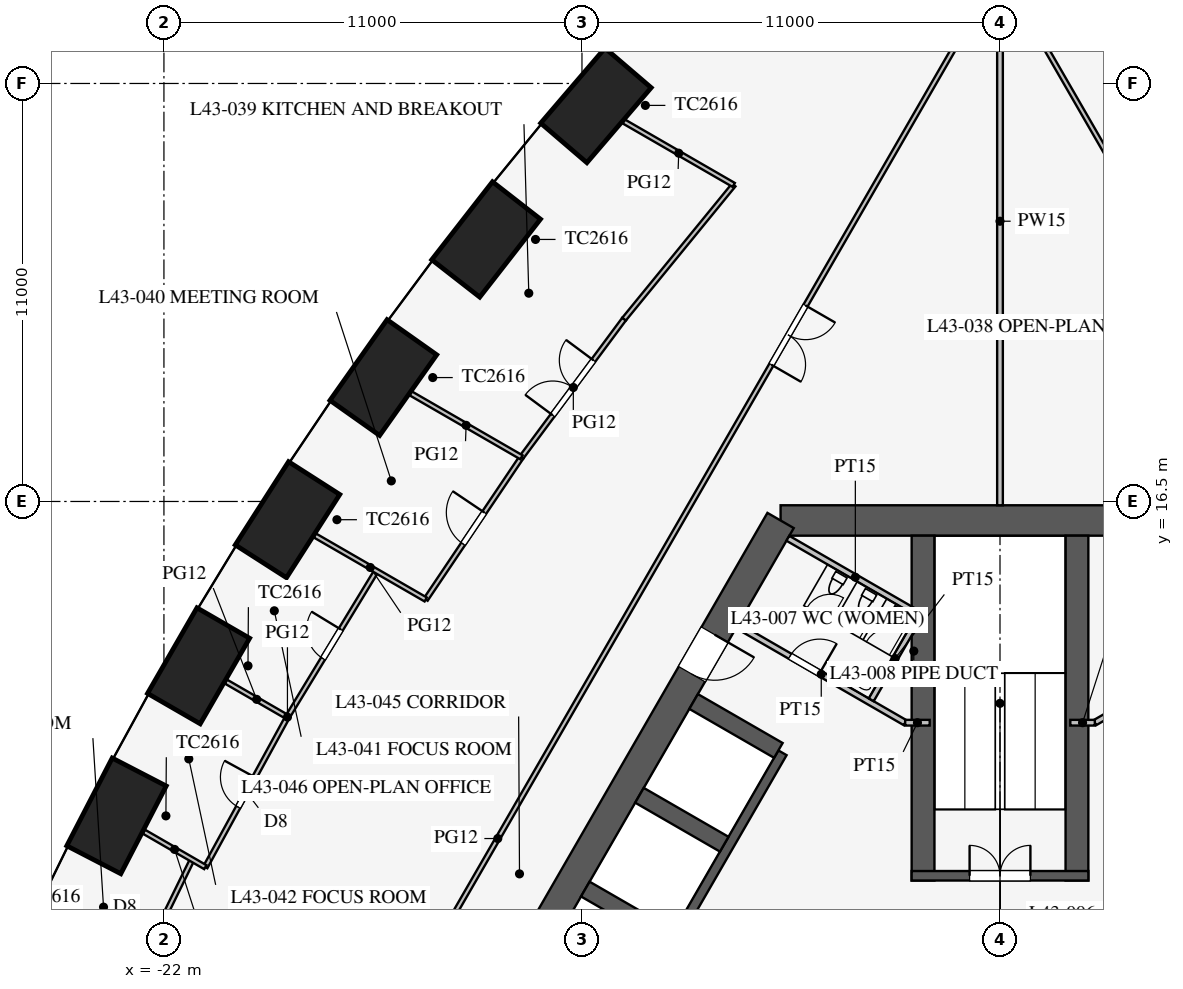
"""IFC4 building model, lengths in metres.
Left out: names, types, materials, properties, quantities, classifications, styles, units other than length and angle.
Written with IfcOpenShell. Run it as: python <this file> out.ifc"""

import sys

from ifc_helpers import new_model, si_unit, direction, frame, frame_2d, origin, origin_2d, place, context, subcontext, project, spatial, rectangle, extrude, element, fill, save


model = new_model("IFC4")
c1 = context("Model", 3, precision=1e-05, world=origin(), true_north=direction((0.0, 1.0)))
c2 = subcontext(c1, "Body", "Model", "MODEL_VIEW")
j1 = project(units=[si_unit("LENGTHUNIT", "METRE"), si_unit("PLANEANGLEUNIT", "RADIAN")], contexts=[c1])
p1 = place(None, origin())
s1 = spatial("IfcSite", under=j1, at=p1, CompositionType="ELEMENT")
p2 = place(p1, origin())
s2 = spatial("IfcBuilding", under=s1, at=p2, CompositionType="ELEMENT")
p3 = place(p2, frame((0.0, 0.0, 189.7)))
s3 = spatial("IfcBuildingStorey", under=s2, at=p3, CompositionType="ELEMENT", Elevation=189.7)
for number, where, z_axis, x_axis in (
    (1, (-10.632, 26.923, 0.0), (0.0, 0.0, 1.0), (-0.651, -0.759, 0.0)),
    (2, (-13.522, 23.396, 0.0), (0.0, 0.0, 1.0), (-0.615, -0.789, 0.0)),
    (3, (-16.227, 19.761, 0.0), (0.0, 0.0, 1.0), (-0.577, -0.816, 0.0)),
    (4, (-18.748, 16.02, 0.0), (0.0, 0.0, 1.0), (-0.539, -0.842, 0.0)),
    (5, (-21.088, 12.175, 0.0), (0.0, 0.0, 1.0), (-0.5, -0.866, 0.0)),
    (6, (-23.248, 8.226, 0.0), (0.0, 0.0, 1.0), (-0.46, -0.888, 0.0)),
):
    element("IfcColumn", number, at=place(p3, frame(where, z_axis=z_axis, x_axis=x_axis)), inside=s3, PredefinedType="COLUMN", context=c2, shape_type="SweptSolid", body=[
        extrude(rectangle(XDim=2.6, YDim=1.6, at=origin_2d()), origin(), (0.0, 0.0, 1.0), 4.2),
    ])
p4 = place(p3, frame((5.773, 16.0, 0.0), z_axis=(0.0, 0.0, 1.0), x_axis=(-1.0, 0.0, 0.0)))
e7 = element("IfcWall", 7, at=p4, inside=s3, PredefinedType="SHEAR", context=c2, shape_type="SweptSolid", body=[
    extrude(rectangle(XDim=11.547, YDim=0.8, at=frame_2d((5.773, 0.0))), origin(), (0.0, 0.0, 1.0), 4.2),
])
p5 = place(p3, frame((-5.773, 16.0, 0.0), z_axis=(0.0, 0.0, 1.0), x_axis=(-0.500002442456, -0.866023993627, 0.0)))
e8 = element("IfcWall", 8, at=p5, inside=s3, PredefinedType="SHEAR", context=c2, shape_type="SweptSolid", body=[
    extrude(rectangle(XDim=21.939, YDim=0.8, at=frame_2d((10.97, 0.0))), origin(), (0.0, 0.0, 1.0), 4.2),
])
p6 = place(p5, frame((17.27, 0.0, 0.0)))
e9 = element("IfcOpeningElement", 9, at=p6, cuts=e8, PredefinedType="OPENING", context=c2, shape_type="SweptSolid", body=[
    extrude(rectangle(XDim=1.2, YDim=2.1, at=frame_2d((0.6, 1.05))), frame((0.0, 0.41, 0.0), z_axis=(0.0, -1.0, 0.0), x_axis=(1.0, 0.0, 0.0)), (0.0, 0.0, 1.0), 0.82),
])
p7 = place(p5, frame((3.47, 0.0, 0.0)))
e10 = element("IfcOpeningElement", 10, at=p7, cuts=e8, PredefinedType="OPENING", context=c2, shape_type="SweptSolid", body=[
    extrude(rectangle(XDim=1.2, YDim=2.1, at=frame_2d((0.6, 1.05))), frame((0.0, 0.41, 0.0), z_axis=(0.0, -1.0, 0.0), x_axis=(1.0, 0.0, 0.0)), (0.0, 0.0, 1.0), 0.82),
])
p8 = place(p3, frame((-5.724, 9.886, 0.0), z_axis=(0.0, 0.0, 1.0), x_axis=(-0.500001763848, -0.866024385424, 0.0)))
e11 = element("IfcWall", 11, at=p8, inside=s3, PredefinedType="SHEAR", context=c2, shape_type="SweptSolid", body=[
    extrude(rectangle(XDim=11.4, YDim=0.25, at=frame_2d((5.7, 0.0))), origin(), (0.0, 0.0, 1.0), 4.2),
])
p9 = place(p8, frame((6.525, 0.0, 0.0)))
e12 = element("IfcOpeningElement", 12, at=p9, cuts=e11, PredefinedType="OPENING", context=c2, shape_type="SweptSolid", body=[
    extrude(rectangle(XDim=1.2, YDim=2.2, at=frame_2d((0.6, 1.1))), frame((0.0, 0.135, 0.0), z_axis=(0.0, -1.0, 0.0), x_axis=(1.0, 0.0, 0.0)), (0.0, 0.0, 1.0), 0.27),
])
p10 = place(p8, frame((9.375, 0.0, 0.0)))
e13 = element("IfcOpeningElement", 13, at=p10, cuts=e11, PredefinedType="OPENING", context=c2, shape_type="SweptSolid", body=[
    extrude(rectangle(XDim=1.2, YDim=2.2, at=frame_2d((0.6, 1.1))), frame((0.0, 0.135, 0.0), z_axis=(0.0, -1.0, 0.0), x_axis=(1.0, 0.0, 0.0)), (0.0, 0.0, 1.0), 0.27),
])
p11 = place(p3, frame((-5.832, 9.949, 0.0), z_axis=(0.0, 0.0, 1.0), x_axis=(-0.866029291668, 0.499993265928, 0.0)))
e14 = element("IfcWall", 14, at=p11, inside=s3, PredefinedType="SHEAR", context=c2, shape_type="SweptSolid", body=[
    extrude(rectangle(XDim=2.575, YDim=0.45, at=frame_2d((1.288, 0.0))), origin(), (0.0, 0.0, 1.0), 4.2),
])
for number, where, z_axis, x_axis in (
    (15, (-7.257, 7.481, 0.0), (0.0, 0.0, 1.0), (-0.866, 0.5, 0.0)),
    (16, (-8.682, 5.012, 0.0), (0.0, 0.0, 1.0), (-0.866, 0.5, 0.0)),
):
    element("IfcWall", number, at=place(p3, frame(where, z_axis=z_axis, x_axis=x_axis)), inside=s3, PredefinedType="SHEAR", context=c2, shape_type="SweptSolid", body=[
        extrude(rectangle(XDim=2.575, YDim=0.45, at=frame_2d((1.288, 0.0))), origin(), (0.0, 0.0, 1.0), 4.2),
    ])
for number, where, z_axis, x_axis in (
    (17, (2.025, 6.525, 0.0), (0.0, 0.0, 1.0), (0.0, 1.0, 0.0)),
    (18, (-2.025, 6.525, 0.0), (0.0, 0.0, 1.0), (0.0, 1.0, 0.0)),
):
    element("IfcWall", number, at=place(p3, frame(where, z_axis=z_axis, x_axis=x_axis)), inside=s3, PredefinedType="SHEAR", context=c2, shape_type="SweptSolid", body=[
        extrude(rectangle(XDim=9.075, YDim=0.6, at=frame_2d((4.538, 0.0))), origin(), (0.0, 0.0, 1.0), 4.2),
    ])
p12 = place(p3, frame((2.325, 6.65, 0.0), z_axis=(0.0, 0.0, 1.0), x_axis=(-1.0, 0.0, 0.0)))
e19 = element("IfcWall", 19, at=p12, inside=s3, PredefinedType="SHEAR", context=c2, shape_type="SweptSolid", body=[
    extrude(rectangle(XDim=4.65, YDim=0.25, at=frame_2d((2.325, 0.0))), origin(), (0.0, 0.0, 1.0), 4.2),
])
p13 = place(p12, frame((1.525, 0.0, 0.0)))
e20 = element("IfcOpeningElement", 20, at=p13, cuts=e19, PredefinedType="OPENING", context=c2, shape_type="SweptSolid", body=[
    extrude(rectangle(XDim=1.6, YDim=2.1, at=frame_2d((0.8, 1.05))), frame((0.0, 0.135, 0.0), z_axis=(0.0, -1.0, 0.0), x_axis=(1.0, 0.0, 0.0)), (0.0, 0.0, 1.0), 0.27),
])
p14 = place(p3, frame((2.495, 10.678, 0.0), z_axis=(0.0, 0.0, 1.0), x_axis=(0.86602216432, 0.500005610874, 0.0)))
e21 = element("IfcWall", 21, at=p14, inside=s3, PredefinedType="PARTITIONING", context=c2, shape_type="SweptSolid", body=[
    extrude(rectangle(XDim=5.1, YDim=0.15, at=frame_2d((2.55, 0.0))), origin(), (0.0, 0.0, 1.0), 4.0),
])
p15 = place(p14, frame((2.6, 0.0, 0.0)))
e22 = element("IfcOpeningElement", 22, at=p15, cuts=e21, PredefinedType="OPENING", context=c2, shape_type="SweptSolid", body=[
    extrude(rectangle(XDim=0.9, YDim=2.1, at=frame_2d((0.45, 1.05))), frame((0.0, 0.085, 0.0), z_axis=(0.0, -1.0, 0.0), x_axis=(1.0, 0.0, 0.0)), (0.0, 0.0, 1.0), 0.17),
])
p16 = place(p3, frame((-2.495, 10.678, 0.0), z_axis=(0.0, 0.0, 1.0), x_axis=(-0.86602216432, 0.500005610874, 0.0)))
e23 = element("IfcWall", 23, at=p16, inside=s3, PredefinedType="PARTITIONING", context=c2, shape_type="SweptSolid", body=[
    extrude(rectangle(XDim=5.1, YDim=0.15, at=frame_2d((2.55, 0.0))), origin(), (0.0, 0.0, 1.0), 4.0),
])
p17 = place(p16, frame((2.6, 0.0, 0.0)))
e24 = element("IfcOpeningElement", 24, at=p17, cuts=e23, PredefinedType="OPENING", context=c2, shape_type="SweptSolid", body=[
    extrude(rectangle(XDim=0.9, YDim=2.1, at=frame_2d((0.45, 1.05))), frame((0.0, 0.085, 0.0), z_axis=(0.0, -1.0, 0.0), x_axis=(1.0, 0.0, 0.0)), (0.0, 0.0, 1.0), 0.17),
])
for number, where, z_axis, x_axis in (
    (25, (2.495, 10.678, 0.0), (0.0, 0.0, 1.0), (-1.0, 0.0, 0.0)),
    (26, (-2.495, 10.678, 0.0), (0.0, 0.0, 1.0), (1.0, 0.0, 0.0)),
):
    element("IfcWall", number, at=place(p3, frame(where, z_axis=z_axis, x_axis=x_axis)), inside=s3, PredefinedType="PARTITIONING", context=c2, shape_type="SweptSolid", body=[
        extrude(rectangle(XDim=0.645, YDim=0.15, at=frame_2d((0.323, 0.0))), origin(), (0.0, 0.0, 1.0), 4.0),
    ])
p18 = place(p3, frame((-2.031, 13.482, 0.0), z_axis=(0.0, 0.0, 1.0), x_axis=(-0.866050731258, 0.499956128963, 0.0)))
e27 = element("IfcWall", 27, at=p18, inside=s3, PredefinedType="PARTITIONING", context=c2, shape_type="SweptSolid", body=[
    extrude(rectangle(XDim=4.1, YDim=0.15, at=frame_2d((2.05, 0.0))), origin(), (0.0, 0.0, 1.0), 4.0),
])
p19 = place(p3, frame((-3.389, 11.281, 0.0), z_axis=(0.0, 0.0, 1.0), x_axis=(0.499989096993, 0.866031698547, 0.0)))
e28 = element("IfcWall", 28, at=p19, inside=s3, PredefinedType="PARTITIONING", context=c2, shape_type="SweptSolid", body=[
    extrude(rectangle(XDim=2.51, YDim=0.15, at=frame_2d((1.255, 0.0))), origin(), (0.0, 0.0, 1.0), 4.0),
])
p20 = place(p3, frame((0.0, 16.4, 0.0), z_axis=(0.0, 0.0, 1.0), x_axis=(0.0, 1.0, 0.0)))
e29 = element("IfcWall", 29, at=p20, inside=s3, PredefinedType="PARTITIONING", context=c2, shape_type="SweptSolid", body=[
    extrude(rectangle(XDim=14.95, YDim=0.15, at=frame_2d((7.475, 0.0))), origin(), (0.0, 0.0, 1.0), 2.4),
])
p21 = place(p3, frame((26.415, -15.231, 0.0), z_axis=(0.0, 0.0, 1.0), x_axis=(-0.50000091641, 0.866024874695, 0.0)))
e30 = element("IfcWall", 30, at=p21, inside=s3, PredefinedType="PARTITIONING", context=c2, shape_type="SweptSolid", body=[
    extrude(rectangle(XDim=52.796, YDim=0.12, at=frame_2d((26.398, 0.0))), origin(), (0.0, 0.0, 1.0), 2.9),
])
p22 = place(p21, frame((10.2, 0.0, 0.15)))
e31 = element("IfcOpeningElement", 31, at=p22, cuts=e30, PredefinedType="OPENING", context=c2, shape_type="SweptSolid", body=[
    extrude(rectangle(XDim=1.8, YDim=2.1, at=frame_2d((0.9, 1.05))), frame((0.0, 0.07, 0.0), z_axis=(0.0, -1.0, 0.0), x_axis=(1.0, 0.0, 0.0)), (0.0, 0.0, 1.0), 0.14),
])
p23 = place(p21, frame((40.8, 0.0, 0.15)))
e32 = element("IfcOpeningElement", 32, at=p23, cuts=e30, PredefinedType="OPENING", context=c2, shape_type="SweptSolid", body=[
    extrude(rectangle(XDim=1.8, YDim=2.1, at=frame_2d((0.9, 1.05))), frame((0.0, 0.07, 0.0), z_axis=(0.0, -1.0, 0.0), x_axis=(1.0, 0.0, 0.0)), (0.0, 0.0, 1.0), 0.14),
])
p24 = place(p3, frame((-0.016, 30.491, 0.0), z_axis=(0.0, 0.0, 1.0), x_axis=(-0.50000091641, -0.866024874695, 0.0)))
e33 = element("IfcWall", 33, at=p24, inside=s3, PredefinedType="PARTITIONING", context=c2, shape_type="SweptSolid", body=[
    extrude(rectangle(XDim=52.796, YDim=0.12, at=frame_2d((26.398, 0.0))), origin(), (0.0, 0.0, 1.0), 2.9),
])
p25 = place(p24, frame((10.2, 0.0, 0.15)))
e34 = element("IfcOpeningElement", 34, at=p25, cuts=e33, PredefinedType="OPENING", context=c2, shape_type="SweptSolid", body=[
    extrude(rectangle(XDim=1.8, YDim=2.1, at=frame_2d((0.9, 1.05))), frame((0.0, 0.07, 0.0), z_axis=(0.0, -1.0, 0.0), x_axis=(1.0, 0.0, 0.0)), (0.0, 0.0, 1.0), 0.14),
])
p26 = place(p24, frame((40.8, 0.0, 0.15)))
e35 = element("IfcOpeningElement", 35, at=p26, cuts=e33, PredefinedType="OPENING", context=c2, shape_type="SweptSolid", body=[
    extrude(rectangle(XDim=1.8, YDim=2.1, at=frame_2d((0.9, 1.05))), frame((0.0, 0.07, 0.0), z_axis=(0.0, -1.0, 0.0), x_axis=(1.0, 0.0, 0.0)), (0.0, 0.0, 1.0), 0.14),
])
p27 = place(p3, frame((-18.75, 10.825, 0.0), z_axis=(0.0, 0.0, 1.0), x_axis=(-0.479949984371, -0.877295852322, 0.0)))
e36 = element("IfcWall", 36, at=p27, inside=s3, PredefinedType="PARTITIONING", context=c2, shape_type="SweptSolid", body=[
    extrude(rectangle(XDim=4.501, YDim=0.12, at=frame_2d((2.25, 0.0))), origin(), (0.0, 0.0, 1.0), 2.9),
])
p28 = place(p27, frame((1.8, 0.0, 0.15)))
e37 = element("IfcOpeningElement", 37, at=p28, cuts=e36, PredefinedType="OPENING", context=c2, shape_type="SweptSolid", body=[
    extrude(rectangle(XDim=0.9, YDim=2.1, at=frame_2d((0.45, 1.05))), frame((0.0, 0.07, 0.0), z_axis=(0.0, -1.0, 0.0), x_axis=(1.0, 0.0, 0.0)), (0.0, 0.0, 1.0), 0.14),
])
p29 = place(p3, frame((-21.257, 7.076, 0.0), z_axis=(0.0, 0.0, 1.0), x_axis=(-0.43911984878, -0.898428493764, 0.0)))
e38 = element("IfcWall", 38, at=p29, inside=s3, PredefinedType="PARTITIONING", context=c2, shape_type="SweptSolid", body=[
    extrude(rectangle(XDim=4.511, YDim=0.12, at=frame_2d((2.255, 0.0))), origin(), (0.0, 0.0, 1.0), 2.9),
])
p30 = place(p29, frame((1.8, 0.0, 0.15)))
e39 = element("IfcOpeningElement", 39, at=p30, cuts=e38, PredefinedType="OPENING", context=c2, shape_type="SweptSolid", body=[
    extrude(rectangle(XDim=0.9, YDim=2.1, at=frame_2d((0.45, 1.05))), frame((0.0, 0.07, 0.0), z_axis=(0.0, -1.0, 0.0), x_axis=(1.0, 0.0, 0.0)), (0.0, 0.0, 1.0), 0.14),
])
p31 = place(p3, frame((-9.892, 21.299, 0.0), z_axis=(0.0, 0.0, 1.0), x_axis=(-0.596173167565, -0.802855873912, 0.0)))
e40 = element("IfcWall", 40, at=p31, inside=s3, PredefinedType="PARTITIONING", context=c2, shape_type="SweptSolid", body=[
    extrude(rectangle(XDim=4.53, YDim=0.12, at=frame_2d((2.265, 0.0))), origin(), (0.0, 0.0, 1.0), 2.9),
])
p32 = place(p31, frame((1.35, 0.0, 0.15)))
e41 = element("IfcOpeningElement", 41, at=p32, cuts=e40, PredefinedType="OPENING", context=c2, shape_type="SweptSolid", body=[
    extrude(rectangle(XDim=1.8, YDim=2.1, at=frame_2d((0.9, 1.05))), frame((0.0, 0.07, 0.0), z_axis=(0.0, -1.0, 0.0), x_axis=(1.0, 0.0, 0.0)), (0.0, 0.0, 1.0), 0.14),
])
p33 = place(p3, frame((-7.007, 24.83, 0.0), z_axis=(0.0, 0.0, 1.0), x_axis=(-0.632765292047, -0.774343647989, 0.0)))
e42 = element("IfcWall", 42, at=p33, inside=s3, PredefinedType="PARTITIONING", context=c2, shape_type="SweptSolid", body=[
    extrude(rectangle(XDim=4.559, YDim=0.12, at=frame_2d((2.28, 0.0))), origin(), (0.0, 0.0, 1.0), 2.9),
])
p34 = place(p3, frame((-16.41, 14.671, 0.0), z_axis=(0.0, 0.0, 1.0), x_axis=(-0.519790350351, -0.85429385558, 0.0)))
e43 = element("IfcWall", 43, at=p34, inside=s3, PredefinedType="PARTITIONING", context=c2, shape_type="SweptSolid", body=[
    extrude(rectangle(XDim=4.501, YDim=0.12, at=frame_2d((2.25, 0.0))), origin(), (0.0, 0.0, 1.0), 2.9),
])
p35 = place(p34, frame((1.8, 0.0, 0.15)))
e44 = element("IfcOpeningElement", 44, at=p35, cuts=e43, PredefinedType="OPENING", context=c2, shape_type="SweptSolid", body=[
    extrude(rectangle(XDim=0.9, YDim=2.1, at=frame_2d((0.45, 1.05))), frame((0.0, 0.07, 0.0), z_axis=(0.0, -1.0, 0.0), x_axis=(1.0, 0.0, 0.0)), (0.0, 0.0, 1.0), 0.14),
])
p36 = place(p3, frame((-12.592, 17.662, 0.0), z_axis=(0.0, 0.0, 1.0), x_axis=(-0.558466624917, -0.829526991034, 0.0)))
e45 = element("IfcWall", 45, at=p36, inside=s3, PredefinedType="PARTITIONING", context=c2, shape_type="SweptSolid", body=[
    extrude(rectangle(XDim=4.511, YDim=0.12, at=frame_2d((2.255, 0.0))), origin(), (0.0, 0.0, 1.0), 2.9),
])
p37 = place(p36, frame((1.75, 0.0, 0.15)))
e46 = element("IfcOpeningElement", 46, at=p37, cuts=e45, PredefinedType="OPENING", context=c2, shape_type="SweptSolid", body=[
    extrude(rectangle(XDim=1.0, YDim=2.1, at=frame_2d((0.5, 1.05))), frame((0.0, 0.07, 0.0), z_axis=(0.0, -1.0, 0.0), x_axis=(1.0, 0.0, 0.0)), (0.0, 0.0, 1.0), 0.14),
])
p38 = place(p3, frame((-18.75, 10.825, 0.0), z_axis=(0.0, 0.0, 1.0), x_axis=(-0.866057308191, 0.499944735875, 0.0)))
e47 = element("IfcWall", 47, at=p38, inside=s3, PredefinedType="PARTITIONING", context=c2, shape_type="SweptSolid", body=[
    extrude(rectangle(XDim=1.87, YDim=0.12, at=frame_2d((0.935, 0.0))), origin(), (0.0, 0.0, 1.0), 2.6),
])
p39 = place(p3, frame((-20.91, 6.876, 0.0), z_axis=(0.0, 0.0, 1.0), x_axis=(-0.866031075672, 0.499990175874, 0.0)))
e48 = element("IfcWall", 48, at=p39, inside=s3, PredefinedType="PARTITIONING", context=c2, shape_type="SweptSolid", body=[
    extrude(rectangle(XDim=1.868, YDim=0.12, at=frame_2d((0.934, 0.0))), origin(), (0.0, 0.0, 1.0), 2.6),
])
p40 = place(p3, frame((-7.007, 24.83, 0.0), z_axis=(0.0, 0.0, 1.0), x_axis=(-0.86600919026, 0.500028081597, 0.0)))
e49 = element("IfcWall", 49, at=p40, inside=s3, PredefinedType="PARTITIONING", context=c2, shape_type="SweptSolid", body=[
    extrude(rectangle(XDim=3.342, YDim=0.12, at=frame_2d((1.671, 0.0))), origin(), (0.0, 0.0, 1.0), 2.4),
])
p41 = place(p3, frame((-15.111, 13.921, 0.0), z_axis=(0.0, 0.0, 1.0), x_axis=(-0.865999698775, 0.50004451974, 0.0)))
e50 = element("IfcWall", 50, at=p41, inside=s3, PredefinedType="PARTITIONING", context=c2, shape_type="SweptSolid", body=[
    extrude(rectangle(XDim=3.368, YDim=0.12, at=frame_2d((1.684, 0.0))), origin(), (0.0, 0.0, 1.0), 2.6),
])
p42 = place(p3, frame((-12.592, 17.662, 0.0), z_axis=(0.0, 0.0, 1.0), x_axis=(-0.866000611782, 0.500042938549, 0.0)))
e51 = element("IfcWall", 51, at=p42, inside=s3, PredefinedType="PARTITIONING", context=c2, shape_type="SweptSolid", body=[
    extrude(rectangle(XDim=3.363, YDim=0.12, at=frame_2d((1.682, 0.0))), origin(), (0.0, 0.0, 1.0), 2.6),
])
p43 = place(p17, frame((0.9, 0.0, 0.0), z_axis=(0.0, 0.0, 1.0), x_axis=(-1.0, 0.0, 0.0)))
e52 = element("IfcDoor", 52, at=p43, inside=s3, OperationType="SINGLE_SWING_RIGHT", PredefinedType="DOOR", context=c2, shape_type="SweptSolid", body=[
    extrude(rectangle(XDim=0.9, YDim=2.1, at=frame_2d((0.45, 1.05))), frame((0.0, 0.025, 0.0), z_axis=(0.0, -1.0, 0.0), x_axis=(1.0, 0.0, 0.0)), (0.0, 0.0, 1.0), 0.05),
])
fill(e24, e52)
p44 = place(p13, frame((1.6, 0.0, 0.0), z_axis=(0.0, 0.0, 1.0), x_axis=(-1.0, 0.0, 0.0)))
e53 = element("IfcDoor", 53, at=p44, inside=s3, OperationType="DOUBLE_DOOR_SINGLE_SWING", PredefinedType="DOOR", context=c2, shape_type="SweptSolid", body=[
    extrude(rectangle(XDim=1.6, YDim=2.1, at=frame_2d((0.8, 1.05))), frame((0.0, 0.025, 0.0), z_axis=(0.0, -1.0, 0.0), x_axis=(1.0, 0.0, 0.0)), (0.0, 0.0, 1.0), 0.05),
])
fill(e20, e53)
p45 = place(p7, origin())
e54 = element("IfcDoor", 54, at=p45, inside=s3, OperationType="SINGLE_SWING_LEFT", PredefinedType="DOOR", context=c2, shape_type="SweptSolid", body=[
    extrude(rectangle(XDim=1.2, YDim=2.1, at=frame_2d((0.6, 1.05))), frame((0.0, 0.025, 0.0), z_axis=(0.0, -1.0, 0.0), x_axis=(1.0, 0.0, 0.0)), (0.0, 0.0, 1.0), 0.05),
])
fill(e10, e54)
p46 = place(p32, frame((1.8, 0.0, 0.0), z_axis=(0.0, 0.0, 1.0), x_axis=(-1.0, 0.0, 0.0)))
e55 = element("IfcDoor", 55, at=p46, inside=s3, OperationType="DOUBLE_DOOR_SINGLE_SWING", PredefinedType="DOOR", context=c2, shape_type="SweptSolid", body=[
    extrude(rectangle(XDim=1.8, YDim=2.1, at=frame_2d((0.9, 1.05))), frame((0.0, 0.025, 0.0), z_axis=(0.0, -1.0, 0.0), x_axis=(1.0, 0.0, 0.0)), (0.0, 0.0, 1.0), 0.05),
])
fill(e41, e55)
p47 = place(p37, frame((1.0, 0.0, 0.0), z_axis=(0.0, 0.0, 1.0), x_axis=(-1.0, 0.0, 0.0)))
e56 = element("IfcDoor", 56, at=p47, inside=s3, OperationType="SINGLE_SWING_RIGHT", PredefinedType="DOOR", context=c2, shape_type="SweptSolid", body=[
    extrude(rectangle(XDim=1.0, YDim=2.1, at=frame_2d((0.5, 1.05))), frame((0.0, 0.025, 0.0), z_axis=(0.0, -1.0, 0.0), x_axis=(1.0, 0.0, 0.0)), (0.0, 0.0, 1.0), 0.05),
])
fill(e46, e56)
p48 = place(p35, frame((0.9, 0.0, 0.0), z_axis=(0.0, 0.0, 1.0), x_axis=(-1.0, 0.0, 0.0)))
e57 = element("IfcDoor", 57, at=p48, inside=s3, OperationType="SINGLE_SWING_RIGHT", PredefinedType="DOOR", context=c2, shape_type="SweptSolid", body=[
    extrude(rectangle(XDim=0.9, YDim=2.1, at=frame_2d((0.45, 1.05))), frame((0.0, 0.025, 0.0), z_axis=(0.0, -1.0, 0.0), x_axis=(1.0, 0.0, 0.0)), (0.0, 0.0, 1.0), 0.05),
])
fill(e44, e57)
p49 = place(p28, frame((0.9, 0.0, 0.0), z_axis=(0.0, 0.0, 1.0), x_axis=(-1.0, 0.0, 0.0)))
e58 = element("IfcDoor", 58, at=p49, inside=s3, OperationType="SINGLE_SWING_RIGHT", PredefinedType="DOOR", context=c2, shape_type="SweptSolid", body=[
    extrude(rectangle(XDim=0.9, YDim=2.1, at=frame_2d((0.45, 1.05))), frame((0.0, 0.025, 0.0), z_axis=(0.0, -1.0, 0.0), x_axis=(1.0, 0.0, 0.0)), (0.0, 0.0, 1.0), 0.05),
])
fill(e37, e58)
p50 = place(p25, origin())
e59 = element("IfcDoor", 59, at=p50, inside=s3, OperationType="DOUBLE_DOOR_SINGLE_SWING", PredefinedType="DOOR", context=c2, shape_type="SweptSolid", body=[
    extrude(rectangle(XDim=1.8, YDim=2.1, at=frame_2d((0.9, 1.05))), frame((0.0, 0.025, 0.0), z_axis=(0.0, -1.0, 0.0), x_axis=(1.0, 0.0, 0.0)), (0.0, 0.0, 1.0), 0.05),
])
fill(e34, e59)
save(model, sys.argv[1])
